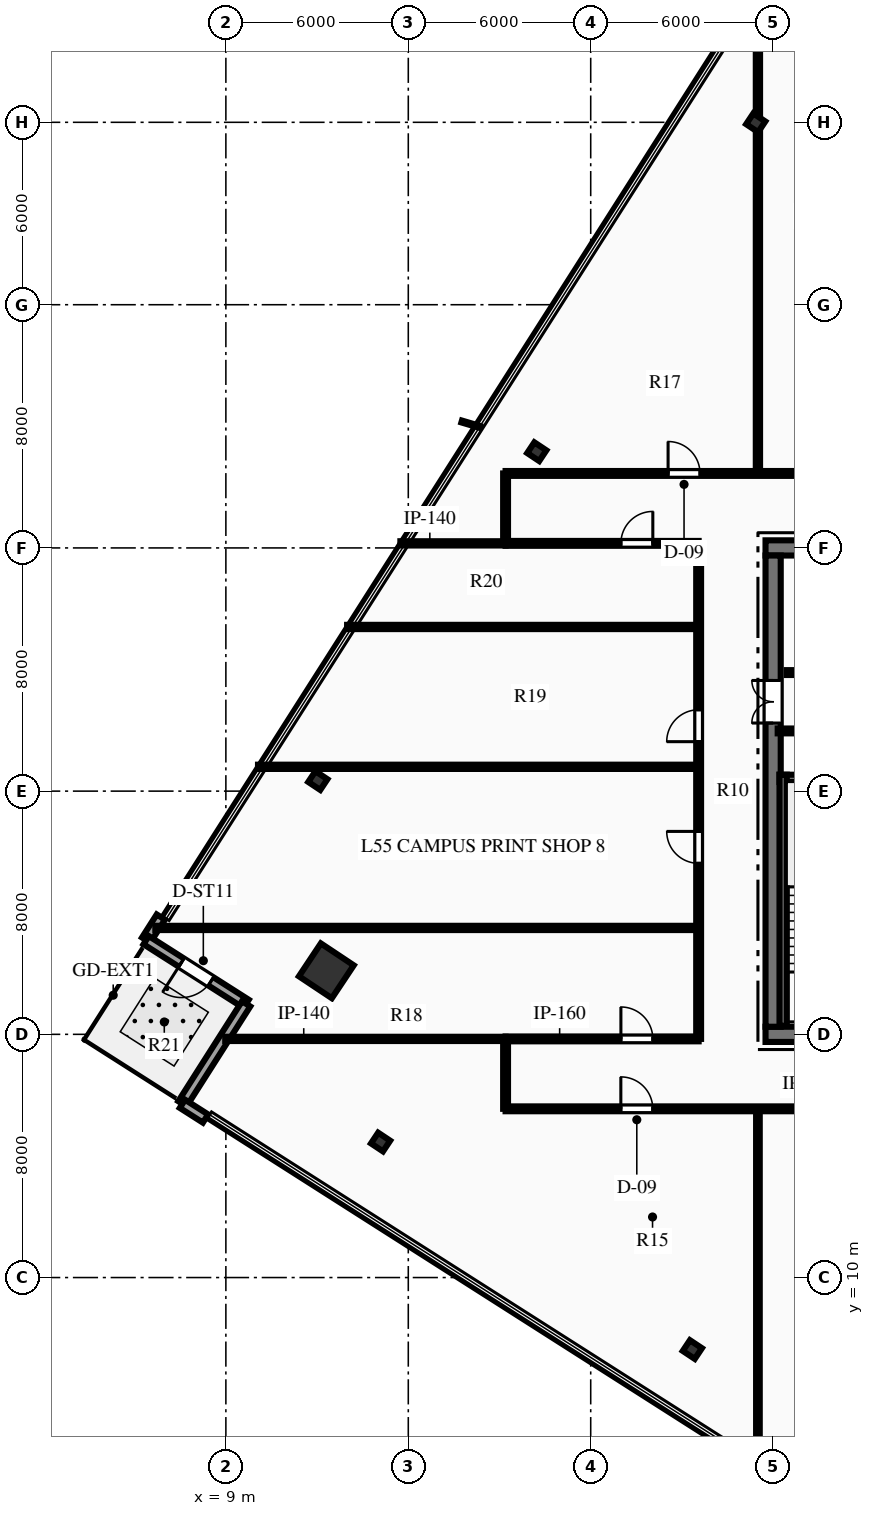
"""IFC4 building model, lengths in metres.
Left out: names, types, materials, properties, quantities, classifications, styles, units other than length and angle.
Written with IfcOpenShell. Run it as: python <this file> out.ifc"""

import sys

from ifc_helpers import new_model, si_unit, direction, frame, frame_2d, origin, origin_2d, place, context, subcontext, project, spatial, rectangle, hollow_rectangle, i_section, extrude, element, fill, save


model = new_model("IFC4")
c1 = context("Model", 3, precision=1e-05, world=origin(), true_north=direction((0.0, 1.0)))
c2 = subcontext(c1, "Body", "Model", "MODEL_VIEW")
j1 = project(units=[si_unit("LENGTHUNIT", "METRE"), si_unit("PLANEANGLEUNIT", "RADIAN")], contexts=[c1])
p1 = place(None, origin())
s1 = spatial("IfcSite", under=j1, at=p1, CompositionType="ELEMENT")
p2 = place(p1, origin())
s2 = spatial("IfcBuilding", under=s1, at=p2, CompositionType="ELEMENT")
p3 = place(p2, frame((0.0, 0.0, 220.95)))
s3 = spatial("IfcBuildingStorey", under=s2, at=p3, CompositionType="ELEMENT", Elevation=220.95)
p4 = place(p3, frame((26.75, 18.0, 0.0), z_axis=(0.0, 0.0, 1.0), x_axis=(1.0, 0.0, 0.0)))
e1 = element("IfcWall", 1, at=p4, inside=s3, PredefinedType="SHEAR", context=c2, shape_type="SweptSolid", body=[
    extrude(rectangle(XDim=18.5, YDim=0.5, at=frame_2d((9.25, 0.0))), origin(), (0.0, 0.0, 1.0), 3.75),
])
p5 = place(p4, frame((7.35, 0.0, 0.0)))
e2 = element("IfcOpeningElement", 2, at=p5, cuts=e1, PredefinedType="OPENING", context=c2, shape_type="SweptSolid", body=[
    extrude(rectangle(XDim=1.1, YDim=2.15, at=frame_2d((0.55, 1.075))), frame((0.0, 0.26, 0.0), z_axis=(0.0, -1.0, 0.0), x_axis=(1.0, 0.0, 0.0)), (0.0, 0.0, 1.0), 0.52),
])
p6 = place(p4, frame((10.05, 0.0, 0.0)))
e3 = element("IfcOpeningElement", 3, at=p6, cuts=e1, PredefinedType="OPENING", context=c2, shape_type="SweptSolid", body=[
    extrude(rectangle(XDim=1.1, YDim=2.15, at=frame_2d((0.55, 1.075))), frame((0.0, 0.26, 0.0), z_axis=(0.0, -1.0, 0.0), x_axis=(1.0, 0.0, 0.0)), (0.0, 0.0, 1.0), 0.52),
])
p7 = place(p3, frame((26.75, 34.0, 0.0), z_axis=(0.0, 0.0, 1.0), x_axis=(1.0, 0.0, 0.0)))
e4 = element("IfcWall", 4, at=p7, inside=s3, PredefinedType="SHEAR", context=c2, shape_type="SweptSolid", body=[
    extrude(rectangle(XDim=18.5, YDim=0.5, at=frame_2d((9.25, 0.0))), origin(), (0.0, 0.0, 1.0), 3.75),
])
p8 = place(p7, frame((13.935, 0.0, 0.0)))
e5 = element("IfcOpeningElement", 5, at=p8, cuts=e4, PredefinedType="OPENING", context=c2, shape_type="SweptSolid", body=[
    extrude(rectangle(XDim=1.1, YDim=2.15, at=frame_2d((0.55, 1.075))), frame((0.0, 0.26, 0.0), z_axis=(0.0, -1.0, 0.0), x_axis=(1.0, 0.0, 0.0)), (0.0, 0.0, 1.0), 0.52),
])
p9 = place(p7, frame((16.185, 0.0, 0.0)))
e6 = element("IfcOpeningElement", 6, at=p9, cuts=e4, PredefinedType="OPENING", context=c2, shape_type="SweptSolid", body=[
    extrude(rectangle(XDim=1.1, YDim=2.15, at=frame_2d((0.55, 1.075))), frame((0.0, 0.26, 0.0), z_axis=(0.0, -1.0, 0.0), x_axis=(1.0, 0.0, 0.0)), (0.0, 0.0, 1.0), 0.52),
])
p10 = place(p3, frame((27.0, 18.25, 0.0), z_axis=(0.0, 0.0, 1.0), x_axis=(0.0, 1.0, 0.0)))
e7 = element("IfcWall", 7, at=p10, inside=s3, PredefinedType="SHEAR", context=c2, shape_type="SweptSolid", body=[
    extrude(rectangle(XDim=15.5, YDim=0.5, at=frame_2d((7.75, 0.0))), origin(), (0.0, 0.0, 1.0), 3.75),
])
p11 = place(p10, frame((9.99, 0.0, 0.0)))
e8 = element("IfcOpeningElement", 8, at=p11, cuts=e7, PredefinedType="OPENING", context=c2, shape_type="SweptSolid", body=[
    extrude(rectangle(XDim=1.4, YDim=2.2, at=frame_2d((0.7, 1.1))), frame((0.0, 0.26, 0.0), z_axis=(0.0, -1.0, 0.0), x_axis=(1.0, 0.0, 0.0)), (0.0, 0.0, 1.0), 0.52),
])
p12 = place(p3, frame((27.21, 26.42, 0.0), z_axis=(0.0, 0.0, 1.0), x_axis=(1.0, 0.0, 0.0)))
e9 = element("IfcWall", 9, at=p12, inside=s3, PredefinedType="SHEAR", context=c2, shape_type="SweptSolid", body=[
    extrude(rectangle(XDim=3.98, YDim=0.24, at=frame_2d((1.99, 0.0))), origin(), (0.0, 0.0, 1.0), 3.75),
])
p13 = place(p3, frame((27.33, 18.28, 0.0), z_axis=(0.0, 0.0, 1.0), x_axis=(0.0, 1.0, 0.0)))
e10 = element("IfcWall", 10, at=p13, inside=s3, PredefinedType="SHEAR", context=c2, shape_type="SweptSolid", body=[
    extrude(rectangle(XDim=8.26, YDim=0.24, at=frame_2d((4.13, 0.0))), origin(), (0.0, 0.0, 1.0), 3.75),
])
p14 = place(p3, frame((12.305, 20.09, 0.0), z_axis=(0.0, 0.0, 1.0), x_axis=(0.554118199338, 0.832437998389, 0.0)))
e11 = element("IfcColumn", 11, at=p14, inside=s3, PredefinedType="COLUMN", context=c2, shape_type="SweptSolid", body=[
    extrude(hollow_rectangle(XDim=1.3, YDim=1.3, WallThickness=0.06, at=origin_2d()), origin(), (0.0, 0.0, 1.0), 3.75),
])
for number, where, z_axis, x_axis in (
    (12, (26.428, 47.984, 0.0), (0.0, 0.0, 1.0), (0.554, 0.832, 0.0)),
    (13, (19.226, 37.166, 0.0), (0.0, 0.0, 1.0), (0.554, 0.832, 0.0)),
    (14, (12.025, 26.347, 0.0), (0.0, 0.0, 1.0), (0.554, 0.832, 0.0)),
    (15, (14.088, 14.458, 0.0), (0.0, 0.0, 1.0), (0.554, 0.832, 0.0)),
    (16, (24.343, 7.631, 0.0), (0.0, 0.0, 1.0), (0.554, 0.832, 0.0)),
):
    element("IfcColumn", number, at=place(p3, frame(where, z_axis=z_axis, x_axis=x_axis)), inside=s3, PredefinedType="COLUMN", context=c2, shape_type="SweptSolid", body=[
        extrude(i_section(OverallWidth=0.424, OverallDepth=0.474, WebThickness=0.048, FlangeThickness=0.077, at=origin_2d()), origin(), (0.0, 0.0, 1.0), 3.75),
    ])
p15 = place(p3, frame((6.377, 21.099, 0.0), z_axis=(0.0, 0.0, 1.0), x_axis=(0.537366861127, 0.843348597297, 0.0)))
e17 = element("IfcWall", 17, at=p15, inside=s3, PredefinedType="STANDARD", context=c2, shape_type="SweptSolid", body=[
    extrude(rectangle(XDim=0.9, YDim=0.32, at=frame_2d((0.45, 0.0))), origin(), (0.0, 0.0, 1.0), 3.47),
])
p16 = place(p3, frame((9.667, 19.003, 0.0), z_axis=(0.0, 0.0, 1.0), x_axis=(-0.8433984701, 0.537288582266, 0.0)))
e18 = element("IfcWall", 18, at=p16, inside=s3, PredefinedType="STANDARD", context=c2, shape_type="SweptSolid", body=[
    extrude(rectangle(XDim=3.9, YDim=0.32, at=frame_2d((1.95, 0.0))), origin(), (0.0, 0.0, 1.0), 3.47),
])
p17 = place(p16, frame((1.375, 0.0, 0.0)))
e19 = element("IfcOpeningElement", 19, at=p17, cuts=e18, PredefinedType="OPENING", context=c2, shape_type="SweptSolid", body=[
    extrude(rectangle(XDim=1.15, YDim=2.2, at=frame_2d((0.575, 1.1))), frame((0.0, 0.17, 0.0), z_axis=(0.0, -1.0, 0.0), x_axis=(1.0, 0.0, 0.0)), (0.0, 0.0, 1.0), 0.34),
])
p18 = place(p3, frame((7.571, 15.714, 0.0), z_axis=(0.0, 0.0, 1.0), x_axis=(0.537316950166, 0.843380397605, 0.0)))
e20 = element("IfcWall", 20, at=p18, inside=s3, PredefinedType="STANDARD", context=c2, shape_type="SweptSolid", body=[
    extrude(rectangle(XDim=3.9, YDim=0.32, at=frame_2d((1.95, 0.0))), origin(), (0.0, 0.0, 1.0), 3.47),
])
p19 = place(p3, frame((8.33, 15.23, 0.0), z_axis=(0.0, 0.0, 1.0), x_axis=(-0.843348597297, 0.537366861127, 0.0)))
e21 = element("IfcWall", 21, at=p19, inside=s3, PredefinedType="STANDARD", context=c2, shape_type="SweptSolid", body=[
    extrude(rectangle(XDim=0.9, YDim=0.32, at=frame_2d((0.45, 0.0))), origin(), (0.0, 0.0, 1.0), 3.47),
])
p20 = place(p3, frame((27.15, 27.98, 0.0), z_axis=(0.0, 0.0, 1.0), x_axis=(1.0, 0.0, 0.0)))
e22 = element("IfcWall", 22, at=p20, inside=s3, PredefinedType="PARTITIONING", context=c2, shape_type="SweptSolid", body=[
    extrude(rectangle(XDim=4.05, YDim=0.16, at=frame_2d((2.025, 0.0))), origin(), (0.0, 0.0, 1.0), 3.47),
])
p21 = place(p20, frame((1.625, 0.0, 0.0)))
e23 = element("IfcOpeningElement", 23, at=p21, cuts=e22, PredefinedType="OPENING", context=c2, shape_type="SweptSolid", body=[
    extrude(rectangle(XDim=0.95, YDim=2.15, at=frame_2d((0.475, 1.075))), frame((0.0, 0.09, 0.0), z_axis=(0.0, -1.0, 0.0), x_axis=(1.0, 0.0, 0.0)), (0.0, 0.0, 1.0), 0.18),
])
p22 = place(p3, frame((27.45, 29.9, 0.0), z_axis=(0.0, 0.0, 1.0), x_axis=(1.0, 0.0, 0.0)))
e24 = element("IfcWall", 24, at=p22, inside=s3, PredefinedType="PARTITIONING", context=c2, shape_type="SweptSolid", body=[
    extrude(rectangle(XDim=4.43, YDim=0.16, at=frame_2d((2.215, 0.0))), origin(), (0.0, 0.0, 1.0), 3.47),
])
p23 = place(p22, frame((1.675, 0.0, 0.0)))
e25 = element("IfcOpeningElement", 25, at=p23, cuts=e24, PredefinedType="OPENING", context=c2, shape_type="SweptSolid", body=[
    extrude(rectangle(XDim=0.95, YDim=2.15, at=frame_2d((0.475, 1.075))), frame((0.0, 0.09, 0.0), z_axis=(0.0, -1.0, 0.0), x_axis=(1.0, 0.0, 0.0)), (0.0, 0.0, 1.0), 0.18),
])
p24 = place(p3, frame((18.2, 15.55, 0.0), z_axis=(0.0, 0.0, 1.0), x_axis=(1.0, 0.0, 0.0)))
e26 = element("IfcWall", 26, at=p24, inside=s3, PredefinedType="PARTITIONING", context=c2, shape_type="SweptSolid", body=[
    extrude(rectangle(XDim=35.6, YDim=0.16, at=frame_2d((17.8, 0.0))), origin(), (0.0, 0.0, 1.0), 2.849),
])
p25 = place(p24, frame((3.791, 0.0, 0.0)))
e27 = element("IfcOpeningElement", 27, at=p25, cuts=e26, PredefinedType="OPENING", context=c2, shape_type="SweptSolid", body=[
    extrude(rectangle(XDim=1.05, YDim=2.15, at=frame_2d((0.525, 1.075))), frame((0.0, 0.09, 0.0), z_axis=(0.0, -1.0, 0.0), x_axis=(1.0, 0.0, 0.0)), (0.0, 0.0, 1.0), 0.18),
])
p26 = place(p24, frame((18.095, 0.0, 0.0)))
e28 = element("IfcOpeningElement", 28, at=p26, cuts=e26, PredefinedType="OPENING", context=c2, shape_type="SweptSolid", body=[
    extrude(rectangle(XDim=1.05, YDim=2.15, at=frame_2d((0.525, 1.075))), frame((0.0, 0.09, 0.0), z_axis=(0.0, -1.0, 0.0), x_axis=(1.0, 0.0, 0.0)), (0.0, 0.0, 1.0), 0.18),
])
p27 = place(p24, frame((25.055, 0.0, 0.0)))
e29 = element("IfcOpeningElement", 29, at=p27, cuts=e26, PredefinedType="OPENING", context=c2, shape_type="SweptSolid", body=[
    extrude(rectangle(XDim=1.05, YDim=2.15, at=frame_2d((0.525, 1.075))), frame((0.0, 0.09, 0.0), z_axis=(0.0, -1.0, 0.0), x_axis=(1.0, 0.0, 0.0)), (0.0, 0.0, 1.0), 0.18),
])
p28 = place(p24, frame((31.585, 0.0, 0.0)))
e30 = element("IfcOpeningElement", 30, at=p28, cuts=e26, PredefinedType="OPENING", context=c2, shape_type="SweptSolid", body=[
    extrude(rectangle(XDim=1.05, YDim=2.15, at=frame_2d((0.525, 1.075))), frame((0.0, 0.09, 0.0), z_axis=(0.0, -1.0, 0.0), x_axis=(1.0, 0.0, 0.0)), (0.0, 0.0, 1.0), 0.18),
])
p29 = place(p3, frame((18.2, 17.85, 0.0), z_axis=(0.0, 0.0, 1.0), x_axis=(1.0, 0.0, 0.0)))
e31 = element("IfcWall", 31, at=p29, inside=s3, PredefinedType="PARTITIONING", context=c2, shape_type="SweptSolid", body=[
    extrude(rectangle(XDim=6.35, YDim=0.16, at=frame_2d((3.175, 0.0))), origin(), (0.0, 0.0, 1.0), 3.47),
])
p30 = place(p29, frame((3.793, 0.0, 0.0)))
e32 = element("IfcOpeningElement", 32, at=p30, cuts=e31, PredefinedType="OPENING", context=c2, shape_type="SweptSolid", body=[
    extrude(rectangle(XDim=1.05, YDim=2.15, at=frame_2d((0.525, 1.075))), frame((0.0, 0.09, 0.0), z_axis=(0.0, -1.0, 0.0), x_axis=(1.0, 0.0, 0.0)), (0.0, 0.0, 1.0), 0.18),
])
p31 = place(p3, frame((18.2, 36.45, 0.0), z_axis=(0.0, 0.0, 1.0), x_axis=(1.0, 0.0, 0.0)))
e33 = element("IfcWall", 33, at=p31, inside=s3, PredefinedType="PARTITIONING", context=c2, shape_type="SweptSolid", body=[
    extrude(rectangle(XDim=35.6, YDim=0.16, at=frame_2d((17.8, 0.0))), origin(), (0.0, 0.0, 1.0), 2.849),
])
p32 = place(p31, frame((20.05, 0.0, 0.0)))
e34 = element("IfcOpeningElement", 34, at=p32, cuts=e33, PredefinedType="OPENING", context=c2, shape_type="SweptSolid", body=[
    extrude(rectangle(XDim=0.9, YDim=2.15, at=frame_2d((0.45, 1.075))), frame((0.0, 0.09, 0.0), z_axis=(0.0, -1.0, 0.0), x_axis=(1.0, 0.0, 0.0)), (0.0, 0.0, 1.0), 0.18),
])
p33 = place(p31, frame((22.35, 0.0, 0.0)))
e35 = element("IfcOpeningElement", 35, at=p33, cuts=e33, PredefinedType="OPENING", context=c2, shape_type="SweptSolid", body=[
    extrude(rectangle(XDim=0.9, YDim=2.15, at=frame_2d((0.45, 1.075))), frame((0.0, 0.09, 0.0), z_axis=(0.0, -1.0, 0.0), x_axis=(1.0, 0.0, 0.0)), (0.0, 0.0, 1.0), 0.18),
])
p34 = place(p31, frame((24.6, 0.0, 0.0)))
e36 = element("IfcOpeningElement", 36, at=p34, cuts=e33, PredefinedType="OPENING", context=c2, shape_type="SweptSolid", body=[
    extrude(rectangle(XDim=1.0, YDim=2.15, at=frame_2d((0.5, 1.075))), frame((0.0, 0.09, 0.0), z_axis=(0.0, -1.0, 0.0), x_axis=(1.0, 0.0, 0.0)), (0.0, 0.0, 1.0), 0.18),
])
p35 = place(p31, frame((5.345, 0.0, 0.0)))
e37 = element("IfcOpeningElement", 37, at=p35, cuts=e33, PredefinedType="OPENING", context=c2, shape_type="SweptSolid", body=[
    extrude(rectangle(XDim=1.05, YDim=2.15, at=frame_2d((0.525, 1.075))), frame((0.0, 0.09, 0.0), z_axis=(0.0, -1.0, 0.0), x_axis=(1.0, 0.0, 0.0)), (0.0, 0.0, 1.0), 0.18),
])
p36 = place(p31, frame((15.395, 0.0, 0.0)))
e38 = element("IfcOpeningElement", 38, at=p36, cuts=e33, PredefinedType="OPENING", context=c2, shape_type="SweptSolid", body=[
    extrude(rectangle(XDim=1.05, YDim=2.15, at=frame_2d((0.525, 1.075))), frame((0.0, 0.09, 0.0), z_axis=(0.0, -1.0, 0.0), x_axis=(1.0, 0.0, 0.0)), (0.0, 0.0, 1.0), 0.18),
])
p37 = place(p3, frame((18.2, 34.15, 0.0), z_axis=(0.0, 0.0, 1.0), x_axis=(1.0, 0.0, 0.0)))
e39 = element("IfcWall", 39, at=p37, inside=s3, PredefinedType="PARTITIONING", context=c2, shape_type="SweptSolid", body=[
    extrude(rectangle(XDim=6.35, YDim=0.16, at=frame_2d((3.175, 0.0))), origin(), (0.0, 0.0, 1.0), 3.47),
])
p38 = place(p37, frame((3.793, 0.0, 0.0)))
e40 = element("IfcOpeningElement", 40, at=p38, cuts=e39, PredefinedType="OPENING", context=c2, shape_type="SweptSolid", body=[
    extrude(rectangle(XDim=1.05, YDim=2.15, at=frame_2d((0.525, 1.075))), frame((0.0, 0.09, 0.0), z_axis=(0.0, -1.0, 0.0), x_axis=(1.0, 0.0, 0.0)), (0.0, 0.0, 1.0), 0.18),
])
p39 = place(p3, frame((24.55, 17.85, 0.0), z_axis=(0.0, 0.0, 1.0), x_axis=(0.0, 1.0, 0.0)))
e41 = element("IfcWall", 41, at=p39, inside=s3, PredefinedType="PARTITIONING", context=c2, shape_type="SweptSolid", body=[
    extrude(rectangle(XDim=16.3, YDim=0.16, at=frame_2d((8.15, 0.0))), origin(), (0.0, 0.0, 1.0), 3.47),
])
p40 = place(p39, frame((5.775, 0.0, 0.0)))
e42 = element("IfcOpeningElement", 42, at=p40, cuts=e41, PredefinedType="OPENING", context=c2, shape_type="SweptSolid", body=[
    extrude(rectangle(XDim=1.05, YDim=2.15, at=frame_2d((0.525, 1.075))), frame((0.0, 0.09, 0.0), z_axis=(0.0, -1.0, 0.0), x_axis=(1.0, 0.0, 0.0)), (0.0, 0.0, 1.0), 0.18),
])
p41 = place(p39, frame((9.777, 0.0, 0.0)))
e43 = element("IfcOpeningElement", 43, at=p41, cuts=e41, PredefinedType="OPENING", context=c2, shape_type="SweptSolid", body=[
    extrude(rectangle(XDim=1.05, YDim=2.15, at=frame_2d((0.525, 1.075))), frame((0.0, 0.09, 0.0), z_axis=(0.0, -1.0, 0.0), x_axis=(1.0, 0.0, 0.0)), (0.0, 0.0, 1.0), 0.18),
])
for number, where, z_axis, x_axis in (
    (44, (18.2, 15.55, 0.0), (0.0, 0.0, 1.0), (0.0, 1.0, 0.0)),
    (45, (18.2, 34.15, 0.0), (0.0, 0.0, 1.0), (0.0, 1.0, 0.0)),
):
    element("IfcWall", number, at=place(p3, frame(where, z_axis=z_axis, x_axis=x_axis)), inside=s3, PredefinedType="PARTITIONING", context=c2, shape_type="SweptSolid", body=[
        extrude(rectangle(XDim=2.3, YDim=0.16, at=frame_2d((1.15, 0.0))), origin(), (0.0, 0.0, 1.0), 3.47),
    ])
p42 = place(p3, frame((8.979, 17.85, 0.0), z_axis=(0.0, 0.0, 1.0), x_axis=(1.0, 0.0, 0.0)))
e46 = element("IfcWall", 46, at=p42, inside=s3, PredefinedType="PARTITIONING", context=c2, shape_type="SweptSolid", body=[
    extrude(rectangle(XDim=9.221, YDim=0.14, at=frame_2d((4.61, 0.0))), origin(), (0.0, 0.0, 1.0), 3.47),
])
p43 = place(p3, frame((14.74, 34.15, 0.0), z_axis=(0.0, 0.0, 1.0), x_axis=(1.0, 0.0, 0.0)))
e47 = element("IfcWall", 47, at=p43, inside=s3, PredefinedType="PARTITIONING", context=c2, shape_type="SweptSolid", body=[
    extrude(rectangle(XDim=3.46, YDim=0.14, at=frame_2d((1.73, 0.0))), origin(), (0.0, 0.0, 1.0), 3.47),
])
p44 = place(p3, frame((26.5, 3.702, 0.0), z_axis=(0.0, 0.0, 1.0), x_axis=(0.0, 1.0, 0.0)))
e48 = element("IfcWall", 48, at=p44, inside=s3, PredefinedType="PARTITIONING", context=c2, shape_type="SweptSolid", body=[
    extrude(rectangle(XDim=11.848, YDim=0.12, at=frame_2d((5.924, 0.0))), origin(), (0.0, 0.0, 1.0), 2.849),
])
p45 = place(p3, frame((26.5, 36.45, 0.0), z_axis=(0.0, 0.0, 1.0), x_axis=(0.0, 1.0, 0.0)))
e49 = element("IfcWall", 49, at=p45, inside=s3, PredefinedType="PARTITIONING", context=c2, shape_type="SweptSolid", body=[
    extrude(rectangle(XDim=16.16, YDim=0.14, at=frame_2d((8.08, 0.0))), origin(), (0.0, 0.0, 1.0), 3.008),
])
p46 = place(p3, frame((6.68, 21.5, 0.0), z_axis=(0.0, 0.0, 1.0), x_axis=(1.0, 0.0, 0.0)))
e50 = element("IfcWall", 50, at=p46, inside=s3, PredefinedType="PARTITIONING", context=c2, shape_type="SweptSolid", body=[
    extrude(rectangle(XDim=17.87, YDim=0.14, at=frame_2d((8.935, 0.0))), origin(), (0.0, 0.0, 1.0), 3.47),
])
p47 = place(p3, frame((10.057, 26.8, 0.0), z_axis=(0.0, 0.0, 1.0), x_axis=(1.0, 0.0, 0.0)))
e51 = element("IfcWall", 51, at=p47, inside=s3, PredefinedType="PARTITIONING", context=c2, shape_type="SweptSolid", body=[
    extrude(rectangle(XDim=14.493, YDim=0.14, at=frame_2d((7.247, 0.0))), origin(), (0.0, 0.0, 1.0), 3.47),
])
p48 = place(p3, frame((12.988, 31.4, 0.0), z_axis=(0.0, 0.0, 1.0), x_axis=(1.0, 0.0, 0.0)))
e52 = element("IfcWall", 52, at=p48, inside=s3, PredefinedType="PARTITIONING", context=c2, shape_type="SweptSolid", body=[
    extrude(rectangle(XDim=11.562, YDim=0.14, at=frame_2d((5.781, 0.0))), origin(), (0.0, 0.0, 1.0), 3.47),
])
p49 = place(p17, origin())
e53 = element("IfcDoor", 53, at=p49, inside=s3, OperationType="SINGLE_SWING_RIGHT", PredefinedType="DOOR", context=c2, shape_type="SweptSolid", body=[
    extrude(rectangle(XDim=1.15, YDim=2.2, at=frame_2d((0.575, 1.1))), frame((0.0, 0.025, 0.0), z_axis=(0.0, -1.0, 0.0), x_axis=(1.0, 0.0, 0.0)), (0.0, 0.0, 1.0), 0.05),
])
fill(e19, e53)
p50 = place(p11, origin())
e54 = element("IfcDoor", 54, at=p50, inside=s3, OperationType="DOUBLE_DOOR_SINGLE_SWING", PredefinedType="DOOR", context=c2, shape_type="SweptSolid", body=[
    extrude(rectangle(XDim=1.4, YDim=2.2, at=frame_2d((0.7, 1.1))), frame((0.0, 0.025, 0.0), z_axis=(0.0, -1.0, 0.0), x_axis=(1.0, 0.0, 0.0)), (0.0, 0.0, 1.0), 0.05),
])
fill(e8, e54)
p51 = place(p25, origin())
e55 = element("IfcDoor", 55, at=p51, inside=s3, OperationType="SINGLE_SWING_LEFT", PredefinedType="DOOR", context=c2, shape_type="SweptSolid", body=[
    extrude(rectangle(XDim=1.05, YDim=2.15, at=frame_2d((0.525, 1.075))), frame((0.0, 0.025, 0.0), z_axis=(0.0, -1.0, 0.0), x_axis=(1.0, 0.0, 0.0)), (0.0, 0.0, 1.0), 0.05),
])
fill(e27, e55)
p52 = place(p35, origin())
e56 = element("IfcDoor", 56, at=p52, inside=s3, OperationType="SINGLE_SWING_LEFT", PredefinedType="DOOR", context=c2, shape_type="SweptSolid", body=[
    extrude(rectangle(XDim=1.05, YDim=2.15, at=frame_2d((0.525, 1.075))), frame((0.0, 0.025, 0.0), z_axis=(0.0, -1.0, 0.0), x_axis=(1.0, 0.0, 0.0)), (0.0, 0.0, 1.0), 0.05),
])
fill(e37, e56)
p53 = place(p30, origin())
e57 = element("IfcDoor", 57, at=p53, inside=s3, OperationType="SINGLE_SWING_LEFT", PredefinedType="DOOR", context=c2, shape_type="SweptSolid", body=[
    extrude(rectangle(XDim=1.05, YDim=2.15, at=frame_2d((0.525, 1.075))), frame((0.0, 0.025, 0.0), z_axis=(0.0, -1.0, 0.0), x_axis=(1.0, 0.0, 0.0)), (0.0, 0.0, 1.0), 0.05),
])
fill(e32, e57)
p54 = place(p40, origin())
e58 = element("IfcDoor", 58, at=p54, inside=s3, OperationType="SINGLE_SWING_RIGHT", PredefinedType="DOOR", context=c2, shape_type="SweptSolid", body=[
    extrude(rectangle(XDim=1.05, YDim=2.15, at=frame_2d((0.525, 1.075))), frame((0.0, 0.025, 0.0), z_axis=(0.0, -1.0, 0.0), x_axis=(1.0, 0.0, 0.0)), (0.0, 0.0, 1.0), 0.05),
])
fill(e42, e58)
p55 = place(p41, origin())
e59 = element("IfcDoor", 59, at=p55, inside=s3, OperationType="SINGLE_SWING_LEFT", PredefinedType="DOOR", context=c2, shape_type="SweptSolid", body=[
    extrude(rectangle(XDim=1.05, YDim=2.15, at=frame_2d((0.525, 1.075))), frame((0.0, 0.025, 0.0), z_axis=(0.0, -1.0, 0.0), x_axis=(1.0, 0.0, 0.0)), (0.0, 0.0, 1.0), 0.05),
])
fill(e43, e59)
p56 = place(p38, origin())
e60 = element("IfcDoor", 60, at=p56, inside=s3, OperationType="SINGLE_SWING_RIGHT", PredefinedType="DOOR", context=c2, shape_type="SweptSolid", body=[
    extrude(rectangle(XDim=1.05, YDim=2.15, at=frame_2d((0.525, 1.075))), frame((0.0, 0.025, 0.0), z_axis=(0.0, -1.0, 0.0), x_axis=(1.0, 0.0, 0.0)), (0.0, 0.0, 1.0), 0.05),
])
fill(e40, e60)
save(model, sys.argv[1])
